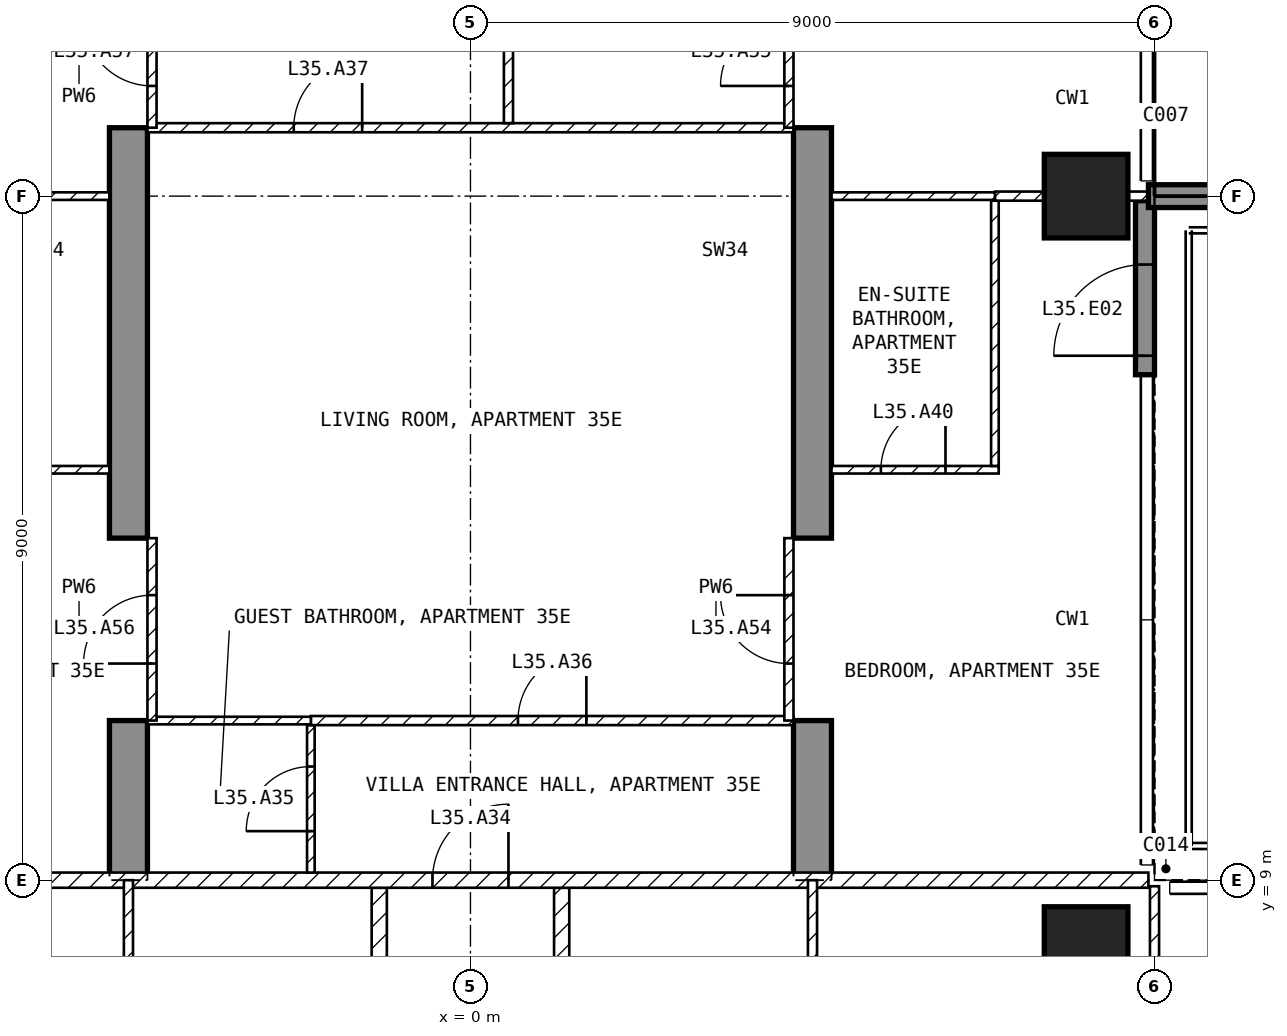
"""IFC4 building model, lengths in metres.
Left out: names, types, materials, properties, quantities, classifications, styles, units other than length and angle.
Written with IfcOpenShell. Run it as: python <this file> out.ifc"""

import sys

from ifc_helpers import new_model, si_unit, direction, frame, frame_2d, origin, origin_2d, place, context, subcontext, project, spatial, polyline, rectangle, outline, extrude, element, fill, save


model = new_model("IFC4")
c1 = context("Model", 3, precision=1e-05, world=origin(), true_north=direction((0.0, 1.0)))
c2 = subcontext(c1, "Body", "Model", "MODEL_VIEW")
j1 = project(units=[si_unit("LENGTHUNIT", "METRE"), si_unit("PLANEANGLEUNIT", "RADIAN")], contexts=[c1])
p1 = place(None, origin())
s1 = spatial("IfcSite", under=j1, at=p1, CompositionType="ELEMENT")
p2 = place(p1, origin())
s2 = spatial("IfcBuilding", under=s1, at=p2, CompositionType="ELEMENT")
p3 = place(p2, frame((0.0, 0.0, 144.4)))
s3 = spatial("IfcBuildingStorey", under=s2, at=p3, CompositionType="ELEMENT", Elevation=144.4)
for number, where, z_axis, x_axis in (
    (1, (8.1, 8.1, -0.25), (0.0, 0.0, 1.0), (1.0, 0.0, 0.0)),
    (2, (8.1, 18.0, -0.25), (0.0, 0.0, 1.0), (1.0, 0.0, 0.0)),
):
    element("IfcColumn", number, at=place(p3, frame(where, z_axis=z_axis, x_axis=x_axis)), inside=s3, PredefinedType="COLUMN", context=c2, shape_type="SweptSolid", body=[
        extrude(rectangle(XDim=1.1, YDim=1.1, at=origin_2d()), origin(), (0.0, 0.0, 1.0), 3.5),
    ])
for number, where, z_axis, x_axis in (
    (3, (-4.75, 9.0, -0.25), (1.0, 0.0, 0.0), (0.0, 1.0, 0.0)),
    (4, (4.25, 9.0, -0.25), (1.0, 0.0, 0.0), (0.0, 1.0, 0.0)),
):
    element("IfcWall", number, at=place(p3, frame(where, z_axis=z_axis, x_axis=x_axis)), inside=s3, PredefinedType="SHEAR", context=c2, shape_type="SweptSolid", body=[
        extrude(outline(polyline([(0.0, 0.0), (2.1, 0.0), (2.1, 2.65), (4.5, 2.65), (4.5, 0.0), (9.9, 0.0), (9.9, 2.65), (12.3, 2.65), (12.3, 0.0), (16.55, 0.0), (16.55, 3.5), (0.0, 3.5), (0.0, 0.0)])), origin(), (0.0, 0.0, 1.0), 0.5),
    ])
p4 = place(p3, frame((8.875, 15.65, 0.0), z_axis=(0.0, 0.0, 1.0), x_axis=(0.0, 1.0, 0.0)))
e5 = element("IfcWall", 5, at=p4, inside=s3, PredefinedType="SOLIDWALL", context=c2, shape_type="SweptSolid", body=[
    extrude(rectangle(XDim=2.29, YDim=0.25, at=frame_2d((1.145, 0.0))), origin(), (0.0, 0.0, 1.0), 3.25),
])
p5 = place(p4, frame((0.25, 0.0, 0.0)))
e6 = element("IfcOpeningElement", 6, at=p5, cuts=e5, PredefinedType="OPENING", context=c2, shape_type="SweptSolid", body=[
    extrude(rectangle(XDim=1.2, YDim=2.4, at=frame_2d((0.6, 1.2))), frame((0.0, 0.135, 0.0), z_axis=(0.0, -1.0, 0.0), x_axis=(1.0, 0.0, 0.0)), (0.0, 0.0, 1.0), 0.27),
])
p6 = place(p3, frame((8.92, 18.0, 0.0), z_axis=(0.0, 0.0, 1.0), x_axis=(1.0, 0.0, 0.0)))
e7 = element("IfcWall", 7, at=p6, inside=s3, PredefinedType="SOLIDWALL", context=c2, shape_type="SweptSolid", body=[
    extrude(rectangle(XDim=2.82, YDim=0.3, at=frame_2d((1.41, 0.0))), origin(), (0.0, 0.0, 1.0), 3.25),
])
for number, where, z_axis, x_axis in (
    (8, (1.2, 8.9, 0.0), (0.0, 0.0, 1.0), (0.0, -1.0, 0.0)),
    (9, (-1.2, 4.6, 0.0), (0.0, 0.0, 1.0), (0.0, 1.0, 0.0)),
):
    element("IfcWall", number, at=place(p3, frame(where, z_axis=z_axis, x_axis=x_axis)), inside=s3, PredefinedType="PARTITIONING", context=c2, shape_type="SweptSolid", body=[
        extrude(rectangle(XDim=4.3, YDim=0.2, at=frame_2d((2.15, 0.0))), origin(), (0.0, 0.0, 1.0), 3.25),
    ])
p7 = place(p3, frame((-8.92, 9.0, 0.0), z_axis=(0.0, 0.0, 1.0), x_axis=(1.0, 0.0, 0.0)))
e10 = element("IfcWall", 10, at=p7, inside=s3, PredefinedType="PARTITIONING", context=c2, shape_type="SweptSolid", body=[
    extrude(rectangle(XDim=17.84, YDim=0.2, at=frame_2d((8.92, 0.0))), origin(), (0.0, 0.0, 1.0), 3.25),
])
p8 = place(p7, frame((8.42, 0.0, 0.0)))
e11 = element("IfcOpeningElement", 11, at=p8, cuts=e10, PredefinedType="OPENING", context=c2, shape_type="SweptSolid", body=[
    extrude(rectangle(XDim=1.0, YDim=2.1, at=frame_2d((0.5, 1.05))), frame((0.0, 0.11, 0.0), z_axis=(0.0, -1.0, 0.0), x_axis=(1.0, 0.0, 0.0)), (0.0, 0.0, 1.0), 0.22),
])
p9 = place(p3, frame((9.0, 4.8, 0.0), z_axis=(0.0, 0.0, 1.0), x_axis=(0.0, 1.0, 0.0)))
e12 = element("IfcWall", 12, at=p9, inside=s3, PredefinedType="PARTITIONING", context=c2, shape_type="SweptSolid", body=[
    extrude(rectangle(XDim=4.12, YDim=0.12, at=frame_2d((2.06, 0.0))), origin(), (0.0, 0.0, 1.0), 3.25),
])
p10 = place(p9, frame((0.7, 0.0, 0.0)))
e13 = element("IfcOpeningElement", 13, at=p10, cuts=e12, PredefinedType="OPENING", context=c2, shape_type="SweptSolid", body=[
    extrude(rectangle(XDim=0.9, YDim=2.1, at=frame_2d((0.45, 1.05))), frame((0.0, 0.07, 0.0), z_axis=(0.0, -1.0, 0.0), x_axis=(1.0, 0.0, 0.0)), (0.0, 0.0, 1.0), 0.14),
])
p11 = place(p3, frame((4.5, 4.5, 0.0), z_axis=(0.0, 0.0, 1.0), x_axis=(0.0, 1.0, 0.0)))
e14 = element("IfcWall", 14, at=p11, inside=s3, PredefinedType="PARTITIONING", context=c2, shape_type="SweptSolid", body=[
    extrude(rectangle(XDim=4.5, YDim=0.12, at=frame_2d((2.25, 0.0))), origin(), (0.0, 0.0, 1.0), 3.25),
])
p12 = place(p11, frame((1.8, 0.0, 0.0)))
e15 = element("IfcOpeningElement", 15, at=p12, cuts=e14, PredefinedType="OPENING", context=c2, shape_type="SweptSolid", body=[
    extrude(rectangle(XDim=0.9, YDim=2.1, at=frame_2d((0.45, 1.05))), frame((0.0, 0.07, 0.0), z_axis=(0.0, -1.0, 0.0), x_axis=(1.0, 0.0, 0.0)), (0.0, 0.0, 1.0), 0.14),
])
p13 = place(p3, frame((-4.5, 9.0, 0.0), z_axis=(0.0, 0.0, 1.0), x_axis=(0.0, -1.0, 0.0)))
e16 = element("IfcWall", 16, at=p13, inside=s3, PredefinedType="PARTITIONING", context=c2, shape_type="SweptSolid", body=[
    extrude(rectangle(XDim=4.5, YDim=0.12, at=frame_2d((2.25, 0.0))), origin(), (0.0, 0.0, 1.0), 3.25),
])
p14 = place(p13, frame((1.8, 0.0, 0.0)))
e17 = element("IfcOpeningElement", 17, at=p14, cuts=e16, PredefinedType="OPENING", context=c2, shape_type="SweptSolid", body=[
    extrude(rectangle(XDim=0.9, YDim=2.1, at=frame_2d((0.45, 1.05))), frame((0.0, 0.07, 0.0), z_axis=(0.0, -1.0, 0.0), x_axis=(1.0, 0.0, 0.0)), (0.0, 0.0, 1.0), 0.14),
])
p15 = place(p3, frame((-2.1, 9.1, 0.0), z_axis=(0.0, 0.0, 1.0), x_axis=(0.0, 1.0, 0.0)))
e18 = element("IfcWall", 18, at=p15, inside=s3, PredefinedType="PARTITIONING", context=c2, shape_type="SweptSolid", body=[
    extrude(rectangle(XDim=1.94, YDim=0.1, at=frame_2d((0.97, 0.0))), origin(), (0.0, 0.0, 1.0), 3.25),
])
p16 = place(p15, frame((0.545, 0.0, 0.0)))
e19 = element("IfcOpeningElement", 19, at=p16, cuts=e18, PredefinedType="OPENING", context=c2, shape_type="SweptSolid", body=[
    extrude(rectangle(XDim=0.85, YDim=2.1, at=frame_2d((0.425, 1.05))), frame((0.0, 0.06, 0.0), z_axis=(0.0, -1.0, 0.0), x_axis=(1.0, 0.0, 0.0)), (0.0, 0.0, 1.0), 0.12),
])
p17 = place(p3, frame((-2.1, 11.1, 0.0), z_axis=(0.0, 0.0, 1.0), x_axis=(1.0, 0.0, 0.0)))
e20 = element("IfcWall", 20, at=p17, inside=s3, PredefinedType="PARTITIONING", context=c2, shape_type="SweptSolid", body=[
    extrude(rectangle(XDim=6.35, YDim=0.12, at=frame_2d((3.175, 0.0))), origin(), (0.0, 0.0, 1.0), 3.25),
])
p18 = place(p17, frame((2.725, 0.0, 0.0)))
e21 = element("IfcOpeningElement", 21, at=p18, cuts=e20, PredefinedType="OPENING", context=c2, shape_type="SweptSolid", body=[
    extrude(rectangle(XDim=0.9, YDim=2.1, at=frame_2d((0.45, 1.05))), frame((0.0, 0.07, 0.0), z_axis=(0.0, -1.0, 0.0), x_axis=(1.0, 0.0, 0.0)), (0.0, 0.0, 1.0), 0.14),
])
p19 = place(p3, frame((-4.25, 11.1, 0.0), z_axis=(0.0, 0.0, 1.0), x_axis=(1.0, 0.0, 0.0)))
e22 = element("IfcWall", 22, at=p19, inside=s3, PredefinedType="PARTITIONING", context=c2, shape_type="SweptSolid", body=[
    extrude(rectangle(XDim=2.15, YDim=0.1, at=frame_2d((1.075, 0.0))), origin(), (0.0, 0.0, 1.0), 3.25),
])
p20 = place(p3, frame((-4.25, 18.9, 0.0), z_axis=(0.0, 0.0, 1.0), x_axis=(1.0, 0.0, 0.0)))
e23 = element("IfcWall", 23, at=p20, inside=s3, PredefinedType="PARTITIONING", context=c2, shape_type="SweptSolid", body=[
    extrude(rectangle(XDim=8.5, YDim=0.12, at=frame_2d((4.25, 0.0))), origin(), (0.0, 0.0, 1.0), 3.25),
])
p21 = place(p20, frame((1.925, 0.0, 0.0)))
e24 = element("IfcOpeningElement", 24, at=p21, cuts=e23, PredefinedType="OPENING", context=c2, shape_type="SweptSolid", body=[
    extrude(rectangle(XDim=0.9, YDim=2.1, at=frame_2d((0.45, 1.05))), frame((0.0, 0.07, 0.0), z_axis=(0.0, -1.0, 0.0), x_axis=(1.0, 0.0, 0.0)), (0.0, 0.0, 1.0), 0.14),
])
p22 = place(p3, frame((0.5, 23.34, 0.0), z_axis=(0.0, 0.0, 1.0), x_axis=(0.0, -1.0, 0.0)))
e25 = element("IfcWall", 25, at=p22, inside=s3, PredefinedType="PARTITIONING", context=c2, shape_type="SweptSolid", body=[
    extrude(rectangle(XDim=4.38, YDim=0.12, at=frame_2d((2.19, 0.0))), origin(), (0.0, 0.0, 1.0), 3.25),
])
p23 = place(p22, frame((1.74, 0.0, 0.0)))
e26 = element("IfcOpeningElement", 26, at=p23, cuts=e25, PredefinedType="OPENING", context=c2, shape_type="SweptSolid", body=[
    extrude(rectangle(XDim=0.9, YDim=2.1, at=frame_2d((0.45, 1.05))), frame((0.0, 0.07, 0.0), z_axis=(0.0, -1.0, 0.0), x_axis=(1.0, 0.0, 0.0)), (0.0, 0.0, 1.0), 0.14),
])
p24 = place(p3, frame((4.75, 14.4, 0.0), z_axis=(0.0, 0.0, 1.0), x_axis=(1.0, 0.0, 0.0)))
e27 = element("IfcWall", 27, at=p24, inside=s3, PredefinedType="PARTITIONING", context=c2, shape_type="SweptSolid", body=[
    extrude(rectangle(XDim=2.2, YDim=0.1, at=frame_2d((1.1, 0.0))), origin(), (0.0, 0.0, 1.0), 3.25),
])
p25 = place(p24, frame((0.65, 0.0, 0.0)))
e28 = element("IfcOpeningElement", 28, at=p25, cuts=e27, PredefinedType="OPENING", context=c2, shape_type="SweptSolid", body=[
    extrude(rectangle(XDim=0.85, YDim=2.1, at=frame_2d((0.425, 1.05))), frame((0.0, 0.06, 0.0), z_axis=(0.0, -1.0, 0.0), x_axis=(1.0, 0.0, 0.0)), (0.0, 0.0, 1.0), 0.12),
])
p26 = place(p3, frame((6.9, 14.45, 0.0), z_axis=(0.0, 0.0, 1.0), x_axis=(0.0, 1.0, 0.0)))
e29 = element("IfcWall", 29, at=p26, inside=s3, PredefinedType="PARTITIONING", context=c2, shape_type="SweptSolid", body=[
    extrude(rectangle(XDim=3.49, YDim=0.1, at=frame_2d((1.745, 0.0))), origin(), (0.0, 0.0, 1.0), 3.25),
])
p27 = place(p3, frame((6.9, 18.0, 0.0), z_axis=(0.0, 0.0, 1.0), x_axis=(1.0, 0.0, 0.0)))
e30 = element("IfcWall", 30, at=p27, inside=s3, PredefinedType="PARTITIONING", context=c2, shape_type="SweptSolid", body=[
    extrude(rectangle(XDim=2.02, YDim=0.12, at=frame_2d((1.01, 0.0))), origin(), (0.0, 0.0, 1.0), 2.414),
])
p28 = place(p3, frame((4.75, 18.0, 0.0), z_axis=(0.0, 0.0, 1.0), x_axis=(1.0, 0.0, 0.0)))
e31 = element("IfcWall", 31, at=p28, inside=s3, PredefinedType="PARTITIONING", context=c2, shape_type="SweptSolid", body=[
    extrude(rectangle(XDim=2.15, YDim=0.1, at=frame_2d((1.075, 0.0))), origin(), (0.0, 0.0, 1.0), 2.414),
])
p29 = place(p3, frame((-6.95, 14.4, 0.0), z_axis=(0.0, 0.0, 1.0), x_axis=(1.0, 0.0, 0.0)))
e32 = element("IfcWall", 32, at=p29, inside=s3, PredefinedType="PARTITIONING", context=c2, shape_type="SweptSolid", body=[
    extrude(rectangle(XDim=2.2, YDim=0.1, at=frame_2d((1.1, 0.0))), origin(), (0.0, 0.0, 1.0), 3.25),
])
p30 = place(p3, frame((-6.9, 18.0, 0.0), z_axis=(0.0, 0.0, 1.0), x_axis=(1.0, 0.0, 0.0)))
e33 = element("IfcWall", 33, at=p30, inside=s3, PredefinedType="PARTITIONING", context=c2, shape_type="SweptSolid", body=[
    extrude(rectangle(XDim=2.15, YDim=0.1, at=frame_2d((1.075, 0.0))), origin(), (0.0, 0.0, 1.0), 2.414),
])
p31 = place(p3, frame((4.19, 11.1, 0.0), z_axis=(0.0, 0.0, 1.0), x_axis=(0.0, 1.0, 0.0)))
e34 = element("IfcWall", 34, at=p31, inside=s3, PredefinedType="PARTITIONING", context=c2, shape_type="SweptSolid", body=[
    extrude(rectangle(XDim=2.4, YDim=0.12, at=frame_2d((1.2, 0.0))), origin(), (0.0, 0.0, 1.0), 2.4),
])
p32 = place(p31, frame((0.75, 0.0, 0.0)))
e35 = element("IfcOpeningElement", 35, at=p32, cuts=e34, PredefinedType="OPENING", context=c2, shape_type="SweptSolid", body=[
    extrude(rectangle(XDim=0.9, YDim=2.1, at=frame_2d((0.45, 1.05))), frame((0.0, 0.07, 0.0), z_axis=(0.0, -1.0, 0.0), x_axis=(1.0, 0.0, 0.0)), (0.0, 0.0, 1.0), 0.14),
])
p33 = place(p3, frame((4.19, 18.9, 0.0), z_axis=(0.0, 0.0, 1.0), x_axis=(0.0, 1.0, 0.0)))
e36 = element("IfcWall", 36, at=p33, inside=s3, PredefinedType="PARTITIONING", context=c2, shape_type="SweptSolid", body=[
    extrude(rectangle(XDim=2.4, YDim=0.12, at=frame_2d((1.2, 0.0))), origin(), (0.0, 0.0, 1.0), 2.4),
])
p34 = place(p33, frame((0.55, 0.0, 0.0)))
e37 = element("IfcOpeningElement", 37, at=p34, cuts=e36, PredefinedType="OPENING", context=c2, shape_type="SweptSolid", body=[
    extrude(rectangle(XDim=0.9, YDim=2.1, at=frame_2d((0.45, 1.05))), frame((0.0, 0.07, 0.0), z_axis=(0.0, -1.0, 0.0), x_axis=(1.0, 0.0, 0.0)), (0.0, 0.0, 1.0), 0.14),
])
p35 = place(p3, frame((-4.19, 11.1, 0.0), z_axis=(0.0, 0.0, 1.0), x_axis=(0.0, 1.0, 0.0)))
e38 = element("IfcWall", 38, at=p35, inside=s3, PredefinedType="PARTITIONING", context=c2, shape_type="SweptSolid", body=[
    extrude(rectangle(XDim=2.4, YDim=0.12, at=frame_2d((1.2, 0.0))), origin(), (0.0, 0.0, 1.0), 2.4),
])
p36 = place(p35, frame((0.75, 0.0, 0.0)))
e39 = element("IfcOpeningElement", 39, at=p36, cuts=e38, PredefinedType="OPENING", context=c2, shape_type="SweptSolid", body=[
    extrude(rectangle(XDim=0.9, YDim=2.1, at=frame_2d((0.45, 1.05))), frame((0.0, 0.07, 0.0), z_axis=(0.0, -1.0, 0.0), x_axis=(1.0, 0.0, 0.0)), (0.0, 0.0, 1.0), 0.14),
])
p37 = place(p3, frame((-4.19, 18.9, 0.0), z_axis=(0.0, 0.0, 1.0), x_axis=(0.0, 1.0, 0.0)))
e40 = element("IfcWall", 40, at=p37, inside=s3, PredefinedType="PARTITIONING", context=c2, shape_type="SweptSolid", body=[
    extrude(rectangle(XDim=2.4, YDim=0.12, at=frame_2d((1.2, 0.0))), origin(), (0.0, 0.0, 1.0), 2.4),
])
p38 = place(p37, frame((0.55, 0.0, 0.0)))
e41 = element("IfcOpeningElement", 41, at=p38, cuts=e40, PredefinedType="OPENING", context=c2, shape_type="SweptSolid", body=[
    extrude(rectangle(XDim=0.9, YDim=2.1, at=frame_2d((0.45, 1.05))), frame((0.0, 0.07, 0.0), z_axis=(0.0, -1.0, 0.0), x_axis=(1.0, 0.0, 0.0)), (0.0, 0.0, 1.0), 0.14),
])
p39 = place(p5, origin())
e42 = element("IfcDoor", 42, at=p39, inside=s3, OperationType="SINGLE_SWING_LEFT", PredefinedType="DOOR", context=c2, shape_type="SweptSolid", body=[
    extrude(rectangle(XDim=1.2, YDim=2.4, at=frame_2d((0.6, 1.2))), frame((0.0, 0.025, 0.0), z_axis=(0.0, -1.0, 0.0), x_axis=(1.0, 0.0, 0.0)), (0.0, 0.0, 1.0), 0.05),
])
fill(e6, e42)
p40 = place(p8, origin())
e43 = element("IfcDoor", 43, at=p40, inside=s3, OperationType="SINGLE_SWING_RIGHT", PredefinedType="DOOR", context=c2, shape_type="SweptSolid", body=[
    extrude(rectangle(XDim=1.0, YDim=2.1, at=frame_2d((0.5, 1.05))), frame((0.0, 0.025, 0.0), z_axis=(0.0, -1.0, 0.0), x_axis=(1.0, 0.0, 0.0)), (0.0, 0.0, 1.0), 0.05),
])
fill(e11, e43)
p41 = place(p16, origin())
e44 = element("IfcDoor", 44, at=p41, inside=s3, OperationType="SINGLE_SWING_LEFT", PredefinedType="DOOR", context=c2, shape_type="SweptSolid", body=[
    extrude(rectangle(XDim=0.85, YDim=2.1, at=frame_2d((0.425, 1.05))), frame((0.0, 0.025, 0.0), z_axis=(0.0, -1.0, 0.0), x_axis=(1.0, 0.0, 0.0)), (0.0, 0.0, 1.0), 0.05),
])
fill(e19, e44)
p42 = place(p18, origin())
e45 = element("IfcDoor", 45, at=p42, inside=s3, OperationType="SINGLE_SWING_RIGHT", PredefinedType="DOOR", context=c2, shape_type="SweptSolid", body=[
    extrude(rectangle(XDim=0.9, YDim=2.1, at=frame_2d((0.45, 1.05))), frame((0.0, 0.025, 0.0), z_axis=(0.0, -1.0, 0.0), x_axis=(1.0, 0.0, 0.0)), (0.0, 0.0, 1.0), 0.05),
])
fill(e21, e45)
p43 = place(p21, origin())
e46 = element("IfcDoor", 46, at=p43, inside=s3, OperationType="SINGLE_SWING_RIGHT", PredefinedType="DOOR", context=c2, shape_type="SweptSolid", body=[
    extrude(rectangle(XDim=0.9, YDim=2.1, at=frame_2d((0.45, 1.05))), frame((0.0, 0.025, 0.0), z_axis=(0.0, -1.0, 0.0), x_axis=(1.0, 0.0, 0.0)), (0.0, 0.0, 1.0), 0.05),
])
fill(e24, e46)
p44 = place(p25, origin())
e47 = element("IfcDoor", 47, at=p44, inside=s3, OperationType="SINGLE_SWING_RIGHT", PredefinedType="DOOR", context=c2, shape_type="SweptSolid", body=[
    extrude(rectangle(XDim=0.85, YDim=2.1, at=frame_2d((0.425, 1.05))), frame((0.0, 0.025, 0.0), z_axis=(0.0, -1.0, 0.0), x_axis=(1.0, 0.0, 0.0)), (0.0, 0.0, 1.0), 0.05),
])
fill(e28, e47)
p45 = place(p32, origin())
e48 = element("IfcDoor", 48, at=p45, inside=s3, OperationType="SINGLE_SWING_RIGHT", PredefinedType="DOOR", context=c2, shape_type="SweptSolid", body=[
    extrude(rectangle(XDim=0.9, YDim=2.1, at=frame_2d((0.45, 1.05))), frame((0.0, 0.025, 0.0), z_axis=(0.0, -1.0, 0.0), x_axis=(1.0, 0.0, 0.0)), (0.0, 0.0, 1.0), 0.05),
])
fill(e35, e48)
p46 = place(p34, origin())
e49 = element("IfcDoor", 49, at=p46, inside=s3, OperationType="SINGLE_SWING_LEFT", PredefinedType="DOOR", context=c2, shape_type="SweptSolid", body=[
    extrude(rectangle(XDim=0.9, YDim=2.1, at=frame_2d((0.45, 1.05))), frame((0.0, 0.025, 0.0), z_axis=(0.0, -1.0, 0.0), x_axis=(1.0, 0.0, 0.0)), (0.0, 0.0, 1.0), 0.05),
])
fill(e37, e49)
p47 = place(p36, origin())
e50 = element("IfcDoor", 50, at=p47, inside=s3, OperationType="SINGLE_SWING_LEFT", PredefinedType="DOOR", context=c2, shape_type="SweptSolid", body=[
    extrude(rectangle(XDim=0.9, YDim=2.1, at=frame_2d((0.45, 1.05))), frame((0.0, 0.025, 0.0), z_axis=(0.0, -1.0, 0.0), x_axis=(1.0, 0.0, 0.0)), (0.0, 0.0, 1.0), 0.05),
])
fill(e39, e50)
p48 = place(p38, origin())
e51 = element("IfcDoor", 51, at=p48, inside=s3, OperationType="SINGLE_SWING_RIGHT", PredefinedType="DOOR", context=c2, shape_type="SweptSolid", body=[
    extrude(rectangle(XDim=0.9, YDim=2.1, at=frame_2d((0.45, 1.05))), frame((0.0, 0.025, 0.0), z_axis=(0.0, -1.0, 0.0), x_axis=(1.0, 0.0, 0.0)), (0.0, 0.0, 1.0), 0.05),
])
fill(e41, e51)
save(model, sys.argv[1])
